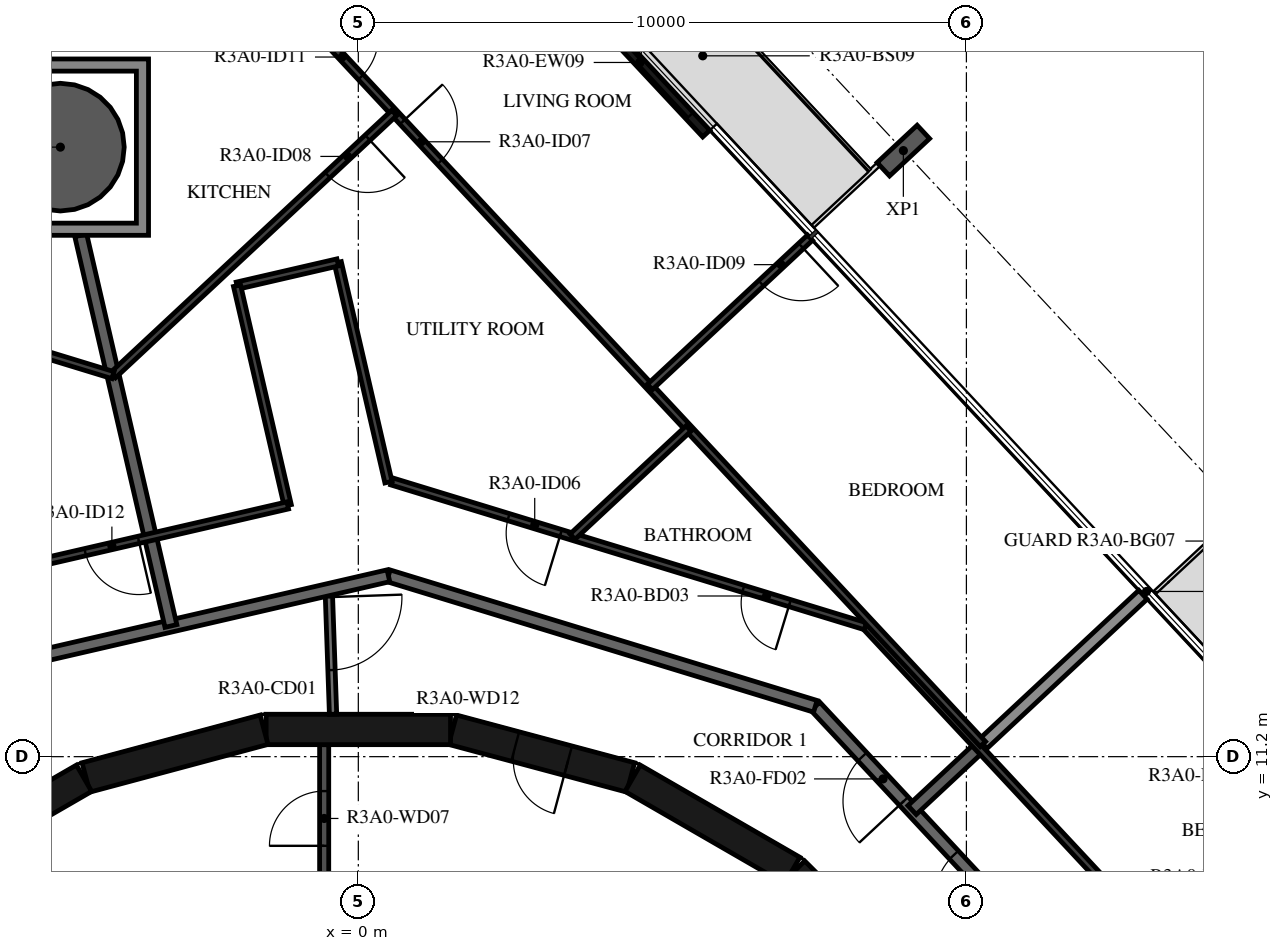
"""IFC4 building model, lengths in metres.
Left out: names, types, materials, properties, quantities, classifications, styles, units other than length and angle.
Written with IfcOpenShell. Run it as: python <this file> out.ifc"""

import sys

from ifc_helpers import new_model, si_unit, direction, frame, frame_2d, origin, origin_2d, place, context, subcontext, project, spatial, polyline, rectangle, hollow_circle, i_section, outline, extrude, element, fill, save


model = new_model("IFC4")
c1 = context("Model", 3, precision=1e-05, world=origin(), true_north=direction((0.0, 1.0)))
c2 = subcontext(c1, "Body", "Model", "MODEL_VIEW")
j1 = project(units=[si_unit("LENGTHUNIT", "METRE"), si_unit("PLANEANGLEUNIT", "RADIAN")], contexts=[c1])
p1 = place(None, origin())
s1 = spatial("IfcSite", under=j1, at=p1, CompositionType="ELEMENT")
p2 = place(p1, origin())
s2 = spatial("IfcBuilding", under=s1, at=p2, CompositionType="ELEMENT")
p3 = place(p2, frame((0.0, 0.0, 120.4)))
s3 = spatial("IfcBuildingStorey", under=s2, at=p3, CompositionType="ELEMENT", Elevation=120.4)
p4 = place(p3, frame((-4.9, 21.223, -0.38), z_axis=(0.0, 0.0, 1.0), x_axis=(1.0, 0.0, 0.0)))
e1 = element("IfcColumn", 1, at=p4, inside=s3, PredefinedType="COLUMN", context=c2, shape_type="SweptSolid", body=[
    extrude(hollow_circle(Radius=1.05, WallThickness=0.05, at=origin_2d()), origin(), (0.0, 0.0, 1.0), 3.5),
])
p5 = place(p3, frame((8.963, 21.167, -0.38), z_axis=(0.0, 0.0, 1.0), x_axis=(0.68199801865, -0.731354019992, 0.0)))
e2 = element("IfcColumn", 2, at=p5, inside=s3, PredefinedType="COLUMN", context=c2, shape_type="SweptSolid", body=[
    extrude(i_section(OverallWidth=0.3, OverallDepth=0.9, WebThickness=0.019, FlangeThickness=0.035, FilletRadius=0.03, at=origin_2d()), origin(), (0.0, 0.0, 1.0), 3.5),
])
p6 = place(p3, frame((5.722, 21.446, 0.0), z_axis=(0.0, 0.0, 1.0), x_axis=(-0.681994703002, 0.731357111866, 0.0)))
e3 = element("IfcWall", 3, at=p6, inside=s3, PredefinedType="STANDARD", context=c2, shape_type="SweptSolid", body=[
    extrude(rectangle(XDim=3.2, YDim=0.16, at=frame_2d((1.6, 0.0))), origin(), (0.0, 0.0, 1.0), 3.12),
])
p7 = place(p6, frame((0.4, 0.0, 0.0)))
e4 = element("IfcOpeningElement", 4, at=p7, cuts=e3, PredefinedType="OPENING", context=c2, shape_type="SweptSolid", body=[
    extrude(rectangle(XDim=2.4, YDim=2.4, at=frame_2d((1.2, 1.2))), frame((0.0, 0.09, 0.0), z_axis=(0.0, -1.0, 0.0), x_axis=(1.0, 0.0, 0.0)), (0.0, 0.0, 1.0), 0.18),
])
p8 = place(p3, frame((9.308, 7.164, 0.0), z_axis=(0.0, 0.0, 1.0), x_axis=(-0.707106781187, 0.707106781187, 0.0)))
e5 = element("IfcWall", 5, at=p8, inside=s3, PredefinedType="SHEAR", context=c2, shape_type="SweptSolid", body=[
    extrude(rectangle(XDim=3.032, YDim=0.5, at=frame_2d((1.516, 0.0))), origin(), (0.0, 0.0, 1.0), 3.12),
])
p9 = place(p8, frame((0.416, 0.0, 0.0)))
e6 = element("IfcOpeningElement", 6, at=p9, cuts=e5, PredefinedType="OPENING", context=c2, shape_type="SweptSolid", body=[
    extrude(rectangle(XDim=1.2, YDim=2.1, at=frame_2d((0.6, 1.05))), frame((0.0, 0.26, 0.0), z_axis=(0.0, -1.0, 0.0), x_axis=(1.0, 0.0, 0.0)), (0.0, 0.0, 1.0), 0.52),
])
p10 = place(p3, frame((7.137, 9.329, 0.0), z_axis=(0.0, 0.0, 1.0), x_axis=(-0.865975092491, 0.500087131594, 0.0)))
e7 = element("IfcWall", 7, at=p10, inside=s3, PredefinedType="SHEAR", context=c2, shape_type="SweptSolid", body=[
    extrude(rectangle(XDim=3.033, YDim=0.5, at=frame_2d((1.516, 0.0))), origin(), (0.0, 0.0, 1.0), 3.12),
])
p11 = place(p3, frame((4.479, 10.858, 0.0), z_axis=(0.0, 0.0, 1.0), x_axis=(-0.965948410781, 0.258734743916, 0.0)))
e8 = element("IfcWall", 8, at=p11, inside=s3, PredefinedType="SHEAR", context=c2, shape_type="SweptSolid", body=[
    extrude(rectangle(XDim=3.033, YDim=0.5, at=frame_2d((1.516, 0.0))), origin(), (0.0, 0.0, 1.0), 3.12),
])
p12 = place(p11, frame((1.066, 0.0, 0.0)))
e9 = element("IfcOpeningElement", 9, at=p12, cuts=e8, PredefinedType="OPENING", context=c2, shape_type="SweptSolid", body=[
    extrude(rectangle(XDim=0.9, YDim=2.1, at=frame_2d((0.45, 1.05))), frame((0.0, 0.26, 0.0), z_axis=(0.0, -1.0, 0.0), x_axis=(1.0, 0.0, 0.0)), (0.0, 0.0, 1.0), 0.52),
])
for number, where, z_axis, x_axis in (
    (10, (1.516, 11.647, 0.0), (0.0, 0.0, 1.0), (-1.0, 0.0, 0.0)),
    (11, (-1.55, 11.643, 0.0), (0.0, 0.0, 1.0), (-0.966, -0.259, 0.0)),
    (12, (-4.51, 10.845, 0.0), (0.0, 0.0, 1.0), (-0.866, -0.5, 0.0)),
):
    element("IfcWall", number, at=place(p3, frame(where, z_axis=z_axis, x_axis=x_axis)), inside=s3, PredefinedType="SHEAR", context=c2, shape_type="SweptSolid", body=[
        extrude(rectangle(XDim=3.033, YDim=0.5, at=frame_2d((1.516, 0.0))), origin(), (0.0, 0.0, 1.0), 3.12),
    ])
p13 = place(p3, frame((-0.562, 8.97, 0.0), z_axis=(0.0, 0.0, 1.0), x_axis=(0.0, 1.0, 0.0)))
e13 = element("IfcWall", 13, at=p13, inside=s3, PredefinedType="PARTITIONING", context=c2, shape_type="SweptSolid", body=[
    extrude(rectangle(XDim=2.427, YDim=0.15, at=frame_2d((1.214, 0.0))), origin(), (0.0, 0.0, 1.0), 3.12),
])
p14 = place(p13, frame((0.764, 0.0, 0.0)))
e14 = element("IfcOpeningElement", 14, at=p14, cuts=e13, PredefinedType="OPENING", context=c2, shape_type="SweptSolid", body=[
    extrude(rectangle(XDim=0.9, YDim=2.1, at=frame_2d((0.45, 1.05))), frame((0.0, 0.085, 0.0), z_axis=(0.0, -1.0, 0.0), x_axis=(1.0, 0.0, 0.0)), (0.0, 0.0, 1.0), 0.17),
])
p15 = place(p3, frame((-0.487, 13.948, 0.0), z_axis=(0.0, 0.0, 1.0), x_axis=(0.034859752231, -0.999392214135, 0.0)))
e15 = element("IfcWall", 15, at=p15, inside=s3, PredefinedType="PARTITIONING", context=c2, shape_type="SweptSolid", body=[
    extrude(rectangle(XDim=2.052, YDim=0.12, at=frame_2d((1.026, 0.0))), origin(), (0.0, 0.0, 1.0), 3.12),
])
p16 = place(p15, frame((0.125, 0.0, 0.0)))
e16 = element("IfcOpeningElement", 16, at=p16, cuts=e15, PredefinedType="OPENING", context=c2, shape_type="SweptSolid", body=[
    extrude(rectangle(XDim=1.2, YDim=2.1, at=frame_2d((0.6, 1.05))), frame((0.0, 0.07, 0.0), z_axis=(0.0, -1.0, 0.0), x_axis=(1.0, 0.0, 0.0)), (0.0, 0.0, 1.0), 0.14),
])
p17 = place(p3, frame((12.523, 6.659, 0.0), z_axis=(0.0, 0.0, 1.0), x_axis=(-0.682001841105, 0.731350455479, 0.0)))
e17 = element("IfcWall", 17, at=p17, inside=s3, PredefinedType="STANDARD", context=c2, shape_type="SweptSolid", body=[
    extrude(rectangle(XDim=7.342, YDim=0.2, at=frame_2d((3.671, 0.0))), origin(), (0.0, 0.0, 1.0), 3.12),
])
p18 = place(p17, frame((3.0, 0.0, 0.0)))
e18 = element("IfcOpeningElement", 18, at=p18, cuts=e17, PredefinedType="OPENING", context=c2, shape_type="SweptSolid", body=[
    extrude(rectangle(XDim=1.0, YDim=2.1, at=frame_2d((0.5, 1.05))), frame((0.0, 0.11, 0.0), z_axis=(0.0, -1.0, 0.0), x_axis=(1.0, 0.0, 0.0)), (0.0, 0.0, 1.0), 0.22),
])
p19 = place(p17, frame((5.209, 0.0, 0.0)))
e19 = element("IfcOpeningElement", 19, at=p19, cuts=e17, PredefinedType="OPENING", context=c2, shape_type="SweptSolid", body=[
    extrude(rectangle(XDim=1.0, YDim=2.1, at=frame_2d((0.5, 1.05))), frame((0.0, 0.11, 0.0), z_axis=(0.0, -1.0, 0.0), x_axis=(1.0, 0.0, 0.0)), (0.0, 0.0, 1.0), 0.22),
])
p20 = place(p3, frame((7.516, 12.028, 0.0), z_axis=(0.0, 0.0, 1.0), x_axis=(-0.956306642771, 0.292365533182, 0.0)))
e20 = element("IfcWall", 20, at=p20, inside=s3, PredefinedType="STANDARD", context=c2, shape_type="SweptSolid", body=[
    extrude(rectangle(XDim=7.342, YDim=0.2, at=frame_2d((3.671, 0.0))), origin(), (0.0, 0.0, 1.0), 3.12),
])
p21 = place(p3, frame((0.495, 14.175, 0.0), z_axis=(0.0, 0.0, 1.0), x_axis=(-0.974376622151, -0.224922649383, 0.0)))
e21 = element("IfcWall", 21, at=p21, inside=s3, PredefinedType="STANDARD", context=c2, shape_type="SweptSolid", body=[
    extrude(rectangle(XDim=7.342, YDim=0.2, at=frame_2d((3.671, 0.0))), origin(), (0.0, 0.0, 1.0), 3.12),
])
p22 = place(p3, frame((10.233, 11.372, 0.0), z_axis=(0.0, 0.0, 1.0), x_axis=(-0.731329353292, -0.682024469513, 0.0)))
e22 = element("IfcWall", 22, at=p22, inside=s3, PredefinedType="STANDARD", context=c2, shape_type="SweptSolid", body=[
    extrude(rectangle(XDim=1.54, YDim=0.2, at=frame_2d((0.77, 0.0))), origin(), (0.0, 0.0, 1.0), 3.12),
])
p23 = place(p3, frame((12.903, 13.862, 0.0), z_axis=(0.0, 0.0, 1.0), x_axis=(-0.731328084739, -0.682025829769, 0.0)))
e23 = element("IfcWall", 23, at=p23, inside=s3, PredefinedType="STANDARD", context=c2, shape_type="SweptSolid", body=[
    extrude(rectangle(XDim=3.6, YDim=0.2, at=frame_2d((1.8, 0.0))), origin(), (0.0, 0.0, 1.0), 2.73),
])
p24 = place(p3, frame((-4.565, 19.773, 0.0), z_axis=(0.0, 0.0, 1.0), x_axis=(0.224940633072, -0.974372470667, 0.0)))
e24 = element("IfcWall", 24, at=p24, inside=s3, PredefinedType="STANDARD", context=c2, shape_type="SweptSolid", body=[
    extrude(rectangle(XDim=6.594, YDim=0.2, at=frame_2d((3.297, 0.0))), origin(), (0.0, 0.0, 1.0), 3.12),
])
p25 = place(p3, frame((13.894, 7.388, 0.0), z_axis=(0.0, 0.0, 1.0), x_axis=(-0.681994622729, 0.731357186721, 0.0)))
e25 = element("IfcWall", 25, at=p25, inside=s3, PredefinedType="PARTITIONING", context=c2, shape_type="SweptSolid", body=[
    extrude(rectangle(XDim=8.146, YDim=0.12, at=frame_2d((4.073, 0.0))), origin(), (0.0, 0.0, 1.0), 3.12),
])
p26 = place(p25, frame((0.2, 0.0, 0.0)))
e26 = element("IfcOpeningElement", 26, at=p26, cuts=e25, PredefinedType="OPENING", context=c2, shape_type="SweptSolid", body=[
    extrude(rectangle(XDim=0.9, YDim=2.1, at=frame_2d((0.45, 1.05))), frame((0.0, 0.07, 0.0), z_axis=(0.0, -1.0, 0.0), x_axis=(1.0, 0.0, 0.0)), (0.0, 0.0, 1.0), 0.14),
])
p27 = place(p3, frame((8.339, 13.345, 0.0), z_axis=(0.0, 0.0, 1.0), x_axis=(-0.956310145342, 0.292354076276, 0.0)))
e27 = element("IfcWall", 27, at=p27, inside=s3, PredefinedType="PARTITIONING", context=c2, shape_type="SweptSolid", body=[
    extrude(rectangle(XDim=8.146, YDim=0.12, at=frame_2d((4.073, 0.0))), origin(), (0.0, 0.0, 1.0), 3.12),
])
p28 = place(p27, frame((1.3, 0.0, 0.0)))
e28 = element("IfcOpeningElement", 28, at=p28, cuts=e27, PredefinedType="OPENING", context=c2, shape_type="SweptSolid", body=[
    extrude(rectangle(XDim=0.8, YDim=2.1, at=frame_2d((0.4, 1.05))), frame((0.0, 0.07, 0.0), z_axis=(0.0, -1.0, 0.0), x_axis=(1.0, 0.0, 0.0)), (0.0, 0.0, 1.0), 0.14),
])
p29 = place(p27, frame((5.237, 0.0, 0.0)))
e29 = element("IfcOpeningElement", 29, at=p29, cuts=e27, PredefinedType="OPENING", context=c2, shape_type="SweptSolid", body=[
    extrude(rectangle(XDim=0.9, YDim=2.1, at=frame_2d((0.45, 1.05))), frame((0.0, 0.07, 0.0), z_axis=(0.0, -1.0, 0.0), x_axis=(1.0, 0.0, 0.0)), (0.0, 0.0, 1.0), 0.14),
])
p30 = place(p3, frame((0.496, 15.714, 0.0), z_axis=(0.0, 0.0, 1.0), x_axis=(-0.224960478174, 0.974367889075, 0.0)))
e30 = element("IfcWall", 30, at=p30, inside=s3, PredefinedType="PARTITIONING", context=c2, shape_type="SweptSolid", body=[
    extrude(rectangle(XDim=3.708, YDim=0.12, at=frame_2d((1.854, 0.0))), origin(), (0.0, 0.0, 1.0), 3.12),
])
p31 = place(p3, frame((-0.338, 19.328, 0.0), z_axis=(0.0, 0.0, 1.0), x_axis=(-0.974383934081, -0.224890971374, 0.0)))
e31 = element("IfcWall", 31, at=p31, inside=s3, PredefinedType="PARTITIONING", context=c2, shape_type="SweptSolid", body=[
    extrude(rectangle(XDim=1.7, YDim=0.12, at=frame_2d((0.85, 0.0))), origin(), (0.0, 0.0, 1.0), 3.12),
])
p32 = place(p3, frame((-1.995, 18.945, 0.0), z_axis=(0.0, 0.0, 1.0), x_axis=(0.224946048274, -0.974371220514, 0.0)))
e32 = element("IfcWall", 32, at=p32, inside=s3, PredefinedType="PARTITIONING", context=c2, shape_type="SweptSolid", body=[
    extrude(rectangle(XDim=3.708, YDim=0.12, at=frame_2d((1.854, 0.0))), origin(), (0.0, 0.0, 1.0), 3.12),
])
p33 = place(p3, frame((-1.161, 15.332, 0.0), z_axis=(0.0, 0.0, 1.0), x_axis=(-0.974373440078, -0.224936433845, 0.0)))
e33 = element("IfcWall", 33, at=p33, inside=s3, PredefinedType="PARTITIONING", context=c2, shape_type="SweptSolid", body=[
    extrude(rectangle(XDim=4.636, YDim=0.12, at=frame_2d((2.318, 0.0))), origin(), (0.0, 0.0, 1.0), 3.12),
])
p34 = place(p33, frame((2.518, 0.0, 0.0)))
e34 = element("IfcOpeningElement", 34, at=p34, cuts=e33, PredefinedType="OPENING", context=c2, shape_type="SweptSolid", body=[
    extrude(rectangle(XDim=0.9, YDim=2.1, at=frame_2d((0.45, 1.05))), frame((0.0, 0.07, 0.0), z_axis=(0.0, -1.0, 0.0), x_axis=(1.0, 0.0, 0.0)), (0.0, 0.0, 1.0), 0.14),
])
p35 = place(p3, frame((-1.539, 24.071, 0.0), z_axis=(0.0, 0.0, 1.0), x_axis=(0.68200220595, -0.731350115252, 0.0)))
e35 = element("IfcWall", 35, at=p35, inside=s3, PredefinedType="PARTITIONING", context=c2, shape_type="SweptSolid", body=[
    extrude(rectangle(XDim=17.316, YDim=0.12, at=frame_2d((8.658, 0.0))), origin(), (0.0, 0.0, 1.0), 3.12),
])
p36 = place(p35, frame((3.323, 0.0, 0.0)))
e36 = element("IfcOpeningElement", 36, at=p36, cuts=e35, PredefinedType="OPENING", context=c2, shape_type="SweptSolid", body=[
    extrude(rectangle(XDim=0.9, YDim=2.1, at=frame_2d((0.45, 1.05))), frame((0.0, 0.07, 0.0), z_axis=(0.0, -1.0, 0.0), x_axis=(1.0, 0.0, 0.0)), (0.0, 0.0, 1.0), 0.14),
])
p37 = place(p35, frame((1.417, 0.0, 0.0)))
e37 = element("IfcOpeningElement", 37, at=p37, cuts=e35, PredefinedType="OPENING", context=c2, shape_type="SweptSolid", body=[
    extrude(rectangle(XDim=0.9, YDim=2.1, at=frame_2d((0.45, 1.05))), frame((0.0, 0.07, 0.0), z_axis=(0.0, -1.0, 0.0), x_axis=(1.0, 0.0, 0.0)), (0.0, 0.0, 1.0), 0.14),
])
p38 = place(p3, frame((7.427, 19.734, 0.0), z_axis=(0.0, 0.0, 1.0), x_axis=(-0.73139345201, -0.681955730497, 0.0)))
e38 = element("IfcWall", 38, at=p38, inside=s3, PredefinedType="PARTITIONING", context=c2, shape_type="SweptSolid", body=[
    extrude(rectangle(XDim=3.6, YDim=0.12, at=frame_2d((1.8, 0.0))), origin(), (0.0, 0.0, 1.0), 2.73),
])
p39 = place(p38, frame((0.2, 0.0, 0.0)))
e39 = element("IfcOpeningElement", 39, at=p39, cuts=e38, PredefinedType="OPENING", context=c2, shape_type="SweptSolid", body=[
    extrude(rectangle(XDim=0.9, YDim=2.1, at=frame_2d((0.45, 1.05))), frame((0.0, 0.07, 0.0), z_axis=(0.0, -1.0, 0.0), x_axis=(1.0, 0.0, 0.0)), (0.0, 0.0, 1.0), 0.14),
])
p40 = place(p3, frame((5.431, 16.597, 0.0), z_axis=(0.0, 0.0, 1.0), x_axis=(-0.731378807316, -0.681971436505, 0.0)))
e40 = element("IfcWall", 40, at=p40, inside=s3, PredefinedType="PARTITIONING", context=c2, shape_type="SweptSolid", body=[
    extrude(rectangle(XDim=2.609, YDim=0.12, at=frame_2d((1.305, 0.0))), origin(), (0.0, 0.0, 1.0), 3.12),
])
p41 = place(p3, frame((0.591, 21.787, 0.0), z_axis=(0.0, 0.0, 1.0), x_axis=(-0.731363296574, -0.681988070588, 0.0)))
e41 = element("IfcWall", 41, at=p41, inside=s3, PredefinedType="PARTITIONING", context=c2, shape_type="SweptSolid", body=[
    extrude(rectangle(XDim=6.324, YDim=0.12, at=frame_2d((3.162, 0.0))), origin(), (0.0, 0.0, 1.0), 3.12),
])
p42 = place(p41, frame((0.6, 0.0, 0.0)))
e42 = element("IfcOpeningElement", 42, at=p42, cuts=e41, PredefinedType="OPENING", context=c2, shape_type="SweptSolid", body=[
    extrude(rectangle(XDim=0.9, YDim=2.1, at=frame_2d((0.45, 1.05))), frame((0.0, 0.07, 0.0), z_axis=(0.0, -1.0, 0.0), x_axis=(1.0, 0.0, 0.0)), (0.0, 0.0, 1.0), 0.14),
])
p43 = place(p3, frame((-10.082, 19.323, 0.0), z_axis=(0.0, 0.0, 1.0), x_axis=(0.956300011431, -0.292387222936, 0.0)))
e43 = element("IfcWall", 43, at=p43, inside=s3, PredefinedType="PARTITIONING", context=c2, shape_type="SweptSolid", body=[
    extrude(rectangle(XDim=6.324, YDim=0.12, at=frame_2d((3.162, 0.0))), origin(), (0.0, 0.0, 1.0), 3.12),
])
p44 = place(p43, frame((0.2, 0.0, 0.0)))
e44 = element("IfcOpeningElement", 44, at=p44, cuts=e43, PredefinedType="OPENING", context=c2, shape_type="SweptSolid", body=[
    extrude(rectangle(XDim=0.9, YDim=2.1, at=frame_2d((0.45, 1.05))), frame((0.0, 0.07, 0.0), z_axis=(0.0, -1.0, 0.0), x_axis=(1.0, 0.0, 0.0)), (0.0, 0.0, 1.0), 0.14),
])
p45 = place(p3, origin())
e45 = element("IfcWall", 45, at=p45, inside=s3, PredefinedType="STANDARD", context=c2, shape_type="SweptSolid", body=[
    extrude(outline(polyline([(-3.45, 22.674), (-3.45, 19.773), (-6.35, 19.773), (-6.35, 22.674), (-3.45, 22.674)]), holes=[polyline([(-6.15, 19.973), (-3.65, 19.973), (-3.65, 22.473), (-6.15, 22.473), (-6.15, 19.973)])]), origin(), (0.0, 0.0, 1.0), 3.12),
])
p46 = place(p7, origin())
e46 = element("IfcDoor", 46, at=p46, inside=s3, OperationType="DOUBLE_DOOR_SLIDING", PredefinedType="DOOR", context=c2, shape_type="SweptSolid", body=[
    extrude(rectangle(XDim=2.4, YDim=2.4, at=frame_2d((1.2, 1.2))), frame((0.0, 0.025, 0.0), z_axis=(0.0, -1.0, 0.0), x_axis=(1.0, 0.0, 0.0)), (0.0, 0.0, 1.0), 0.05),
])
fill(e4, e46)
p47 = place(p14, origin())
e47 = element("IfcDoor", 47, at=p47, inside=s3, OperationType="SINGLE_SWING_RIGHT", PredefinedType="DOOR", context=c2, shape_type="SweptSolid", body=[
    extrude(rectangle(XDim=0.9, YDim=2.1, at=frame_2d((0.45, 1.05))), frame((0.0, 0.025, 0.0), z_axis=(0.0, -1.0, 0.0), x_axis=(1.0, 0.0, 0.0)), (0.0, 0.0, 1.0), 0.05),
])
fill(e14, e47)
p48 = place(p12, origin())
e48 = element("IfcDoor", 48, at=p48, inside=s3, OperationType="SINGLE_SWING_LEFT", PredefinedType="DOOR", context=c2, shape_type="SweptSolid", body=[
    extrude(rectangle(XDim=0.9, YDim=2.1, at=frame_2d((0.45, 1.05))), frame((0.0, 0.025, 0.0), z_axis=(0.0, -1.0, 0.0), x_axis=(1.0, 0.0, 0.0)), (0.0, 0.0, 1.0), 0.05),
])
fill(e9, e48)
p49 = place(p18, origin())
e49 = element("IfcDoor", 49, at=p49, inside=s3, OperationType="SINGLE_SWING_LEFT", PredefinedType="DOOR", context=c2, shape_type="SweptSolid", body=[
    extrude(rectangle(XDim=1.0, YDim=2.1, at=frame_2d((0.5, 1.05))), frame((0.0, 0.025, 0.0), z_axis=(0.0, -1.0, 0.0), x_axis=(1.0, 0.0, 0.0)), (0.0, 0.0, 1.0), 0.05),
])
fill(e18, e49)
p50 = place(p19, origin())
e50 = element("IfcDoor", 50, at=p50, inside=s3, OperationType="SINGLE_SWING_RIGHT", PredefinedType="DOOR", context=c2, shape_type="SweptSolid", body=[
    extrude(rectangle(XDim=1.0, YDim=2.1, at=frame_2d((0.5, 1.05))), frame((0.0, 0.025, 0.0), z_axis=(0.0, -1.0, 0.0), x_axis=(1.0, 0.0, 0.0)), (0.0, 0.0, 1.0), 0.05),
])
fill(e19, e50)
p51 = place(p28, origin())
e51 = element("IfcDoor", 51, at=p51, inside=s3, OperationType="SINGLE_SWING_RIGHT", PredefinedType="DOOR", context=c2, shape_type="SweptSolid", body=[
    extrude(rectangle(XDim=0.8, YDim=2.1, at=frame_2d((0.4, 1.05))), frame((0.0, 0.025, 0.0), z_axis=(0.0, -1.0, 0.0), x_axis=(1.0, 0.0, 0.0)), (0.0, 0.0, 1.0), 0.05),
])
fill(e28, e51)
p52 = place(p29, origin())
e52 = element("IfcDoor", 52, at=p52, inside=s3, OperationType="SINGLE_SWING_RIGHT", PredefinedType="DOOR", context=c2, shape_type="SweptSolid", body=[
    extrude(rectangle(XDim=0.9, YDim=2.1, at=frame_2d((0.45, 1.05))), frame((0.0, 0.025, 0.0), z_axis=(0.0, -1.0, 0.0), x_axis=(1.0, 0.0, 0.0)), (0.0, 0.0, 1.0), 0.05),
])
fill(e29, e52)
p53 = place(p36, origin())
e53 = element("IfcDoor", 53, at=p53, inside=s3, OperationType="SINGLE_SWING_RIGHT", PredefinedType="DOOR", context=c2, shape_type="SweptSolid", body=[
    extrude(rectangle(XDim=0.9, YDim=2.1, at=frame_2d((0.45, 1.05))), frame((0.0, 0.025, 0.0), z_axis=(0.0, -1.0, 0.0), x_axis=(1.0, 0.0, 0.0)), (0.0, 0.0, 1.0), 0.05),
])
fill(e36, e53)
p54 = place(p42, origin())
e54 = element("IfcDoor", 54, at=p54, inside=s3, OperationType="SINGLE_SWING_RIGHT", PredefinedType="DOOR", context=c2, shape_type="SweptSolid", body=[
    extrude(rectangle(XDim=0.9, YDim=2.1, at=frame_2d((0.45, 1.05))), frame((0.0, 0.025, 0.0), z_axis=(0.0, -1.0, 0.0), x_axis=(1.0, 0.0, 0.0)), (0.0, 0.0, 1.0), 0.05),
])
fill(e42, e54)
p55 = place(p39, origin())
e55 = element("IfcDoor", 55, at=p55, inside=s3, OperationType="SINGLE_SWING_LEFT", PredefinedType="DOOR", context=c2, shape_type="SweptSolid", body=[
    extrude(rectangle(XDim=0.9, YDim=2.1, at=frame_2d((0.45, 1.05))), frame((0.0, 0.025, 0.0), z_axis=(0.0, -1.0, 0.0), x_axis=(1.0, 0.0, 0.0)), (0.0, 0.0, 1.0), 0.05),
])
fill(e39, e55)
p56 = place(p37, origin())
e56 = element("IfcDoor", 56, at=p56, inside=s3, OperationType="SINGLE_SWING_LEFT", PredefinedType="DOOR", context=c2, shape_type="SweptSolid", body=[
    extrude(rectangle(XDim=0.9, YDim=2.1, at=frame_2d((0.45, 1.05))), frame((0.0, 0.025, 0.0), z_axis=(0.0, -1.0, 0.0), x_axis=(1.0, 0.0, 0.0)), (0.0, 0.0, 1.0), 0.05),
])
fill(e37, e56)
p57 = place(p34, origin())
e57 = element("IfcDoor", 57, at=p57, inside=s3, OperationType="SINGLE_SWING_LEFT", PredefinedType="DOOR", context=c2, shape_type="SweptSolid", body=[
    extrude(rectangle(XDim=0.9, YDim=2.1, at=frame_2d((0.45, 1.05))), frame((0.0, 0.025, 0.0), z_axis=(0.0, -1.0, 0.0), x_axis=(1.0, 0.0, 0.0)), (0.0, 0.0, 1.0), 0.05),
])
fill(e34, e57)
p58 = place(p16, origin())
e58 = element("IfcDoor", 58, at=p58, inside=s3, OperationType="DOUBLE_DOOR_SINGLE_SWING", PredefinedType="DOOR", context=c2, shape_type="SweptSolid", body=[
    extrude(rectangle(XDim=1.2, YDim=2.1, at=frame_2d((0.6, 1.05))), frame((0.0, 0.025, 0.0), z_axis=(0.0, -1.0, 0.0), x_axis=(1.0, 0.0, 0.0)), (0.0, 0.0, 1.0), 0.05),
])
fill(e16, e58)
save(model, sys.argv[1])
